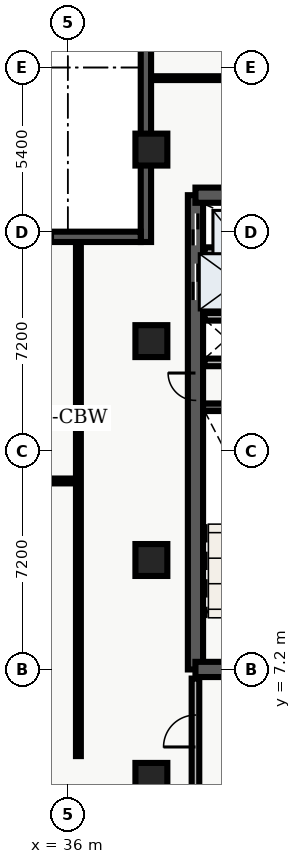
"""IFC4 building model, lengths in metres.
Left out: names, types, materials, properties, quantities, classifications, styles, units other than length and angle.
Written with IfcOpenShell. Run it as: python <this file> out.ifc"""

import sys

from ifc_helpers import new_model, entity, si_unit, converted_unit, direction, frame, origin_with_axes, origin_2d_with_axis, place, context, subcontext, project, spatial, polyline, rectangle, outline, extrude, element, fill, save


model = new_model("IFC4")
c1 = context("Model", 3, precision=1e-05, world=origin_with_axes(), true_north=direction((0.0, 1.0)))
c2 = subcontext(c1, "Body", "Model", "MODEL_VIEW")
j1 = project(units=[si_unit("LENGTHUNIT", "METRE"), converted_unit("PLANEANGLEUNIT", "DEGREE", entity("IfcPlaneAngleMeasure", 0.017), si_unit("PLANEANGLEUNIT", "RADIAN"), dimensions=[0, 0, 0, 0, 0, 0, 0])], contexts=[c1])
p1 = place(None, origin_with_axes())
s1 = spatial("IfcSite", under=j1, at=p1, CompositionType="ELEMENT")
p2 = place(p1, origin_with_axes())
s2 = spatial("IfcBuilding", under=s1, at=p2, CompositionType="ELEMENT")
p3 = place(p2, frame((0.0, 0.0, 171.9), z_axis=(0.0, 0.0, 1.0), x_axis=(1.0, 0.0, 0.0)))
s3 = spatial("IfcBuildingStorey", under=s2, at=p3, CompositionType="ELEMENT", Elevation=171.9)
p4 = place(p3, frame((40.2, 7.2, 0.0), z_axis=(0.0, 0.0, 1.0), x_axis=(0.0, 1.0, 0.0)))
e1 = element("IfcWall", 1, at=p4, inside=s3, PredefinedType="SHEAR", context=c2, shape_type="SweptSolid", body=[
    extrude(outline(polyline([(0.0, -0.25), (15.6, -0.25), (15.6, 0.25), (0.0, 0.25), (0.0, -0.25)])), origin_with_axes(), (0.0, 0.0, 1.0), 3.66),
])
p5 = place(p4, frame((14.475, 0.0, 0.0), z_axis=(0.0, 0.0, 1.0), x_axis=(1.0, 0.0, 0.0)))
e2 = element("IfcOpeningElement", 2, at=p5, cuts=e1, PredefinedType="OPENING", context=c2, shape_type="SweptSolid", body=[
    extrude(rectangle(XDim=1.05, YDim=0.52, at=origin_2d_with_axis()), origin_with_axes(), (0.0, 0.0, 1.0), 2.15),
])
p6 = place(p4, frame((12.75, 0.0, 0.0), z_axis=(0.0, 0.0, 1.0), x_axis=(1.0, 0.0, 0.0)))
e3 = element("IfcOpeningElement", 3, at=p6, cuts=e1, PredefinedType="OPENING", context=c2, shape_type="SweptSolid", body=[
    extrude(rectangle(XDim=1.2, YDim=0.52, at=origin_2d_with_axis()), origin_with_axes(), (0.0, 0.0, 1.0), 2.15),
])
p7 = place(p4, frame((9.3, 0.0, 0.0), z_axis=(0.0, 0.0, 1.0), x_axis=(1.0, 0.0, 0.0)))
e4 = element("IfcOpeningElement", 4, at=p7, cuts=e1, PredefinedType="OPENING", context=c2, shape_type="SweptSolid", body=[
    extrude(rectangle(XDim=0.9, YDim=0.52, at=origin_2d_with_axis()), origin_with_axes(), (0.0, 0.0, 1.0), 2.15),
])
p8 = place(p3, frame((40.2, 7.2, 0.0), z_axis=(0.0, 0.0, 1.0), x_axis=(1.0, 0.0, 0.0)))
e5 = element("IfcWall", 5, at=p8, inside=s3, PredefinedType="SHEAR", context=c2, shape_type="SweptSolid", body=[
    extrude(outline(polyline([(0.0, -0.25), (7.85, -0.25), (7.85, 0.25), (0.0, 0.25), (0.0, -0.25)])), origin_with_axes(), (0.0, 0.0, 1.0), 3.66),
])
p9 = place(p8, frame((2.175, 0.0, 0.0), z_axis=(0.0, 0.0, 1.0), x_axis=(1.0, 0.0, 0.0)))
e6 = element("IfcOpeningElement", 6, at=p9, cuts=e5, PredefinedType="OPENING", context=c2, shape_type="SweptSolid", body=[
    extrude(rectangle(XDim=1.05, YDim=0.52, at=origin_2d_with_axis()), origin_with_axes(), (0.0, 0.0, 1.0), 2.15),
])
p10 = place(p3, frame((40.2, 22.8, 0.0), z_axis=(0.0, 0.0, 1.0), x_axis=(1.0, 0.0, 0.0)))
e7 = element("IfcWall", 7, at=p10, inside=s3, PredefinedType="SHEAR", context=c2, shape_type="SweptSolid", body=[
    extrude(outline(polyline([(0.0, -0.25), (7.85, -0.25), (7.85, 0.25), (0.0, 0.25), (0.0, -0.25)])), origin_with_axes(), (0.0, 0.0, 1.0), 3.66),
])
p11 = place(p10, frame((5.775, 0.0, 0.0), z_axis=(0.0, 0.0, 1.0), x_axis=(1.0, 0.0, 0.0)))
e8 = element("IfcOpeningElement", 8, at=p11, cuts=e7, PredefinedType="OPENING", context=c2, shape_type="SweptSolid", body=[
    extrude(rectangle(XDim=1.05, YDim=0.52, at=origin_2d_with_axis()), origin_with_axes(), (0.0, 0.0, 1.0), 2.15),
])
p12 = place(p3, frame((40.45, 15.825, 0.0), z_axis=(0.0, 0.0, 1.0), x_axis=(1.0, 0.0, 0.0)))
e9 = element("IfcWall", 9, at=p12, inside=s3, PredefinedType="SHEAR", context=c2, shape_type="SweptSolid", body=[
    extrude(outline(polyline([(0.0, -0.125), (3.55, -0.125), (3.55, 0.125), (0.0, 0.125), (0.0, -0.125)])), origin_with_axes(), (0.0, 0.0, 1.0), 3.66),
])
p13 = place(p3, frame((40.5, 17.3, 0.0), z_axis=(0.0, 0.0, 1.0), x_axis=(1.0, 0.0, 0.0)))
e10 = element("IfcWall", 10, at=p13, inside=s3, PredefinedType="SOLIDWALL", context=c2, shape_type="SweptSolid", body=[
    extrude(outline(polyline([(0.0, -0.125), (3.5, -0.125), (3.5, 0.125), (0.0, 0.125), (0.0, -0.125)])), origin_with_axes(), (0.0, 0.0, 1.0), 2.7),
])
p14 = place(p13, frame((2.4, 0.0, 0.0), z_axis=(0.0, 0.0, 1.0), x_axis=(1.0, 0.0, 0.0)))
e11 = element("IfcOpeningElement", 11, at=p14, cuts=e10, PredefinedType="OPENING", context=c2, shape_type="SweptSolid", body=[
    extrude(rectangle(XDim=0.9, YDim=0.27, at=origin_2d_with_axis()), origin_with_axes(), (0.0, 0.0, 1.0), 2.15),
])
p15 = place(p3, frame((40.5, 18.8, 0.0), z_axis=(0.0, 0.0, 1.0), x_axis=(1.0, 0.0, 0.0)))
e12 = element("IfcWall", 12, at=p15, inside=s3, PredefinedType="SOLIDWALL", context=c2, shape_type="SweptSolid", body=[
    extrude(outline(polyline([(0.0, -0.125), (3.5, -0.125), (3.5, 0.125), (0.0, 0.125), (0.0, -0.125)])), origin_with_axes(), (0.0, 0.0, 1.0), 2.7),
])
p16 = place(p3, frame((40.2, 3.1, 0.0), z_axis=(0.0, 0.0, 1.0), x_axis=(0.0, 1.0, 0.0)))
e13 = element("IfcWall", 13, at=p16, inside=s3, PredefinedType="SOLIDWALL", context=c2, shape_type="SweptSolid", body=[
    extrude(outline(polyline([(0.0, -0.125), (3.8, -0.125), (3.8, 0.125), (0.0, 0.125), (0.0, -0.125)])), origin_with_axes(), (0.0, 0.0, 1.0), 2.7),
])
p17 = place(p16, frame((2.075, 0.0, 0.0), z_axis=(0.0, 0.0, 1.0), x_axis=(1.0, 0.0, 0.0)))
e14 = element("IfcOpeningElement", 14, at=p17, cuts=e13, PredefinedType="OPENING", context=c2, shape_type="SweptSolid", body=[
    extrude(rectangle(XDim=1.05, YDim=0.27, at=origin_2d_with_axis()), origin_with_axes(), (0.0, 0.0, 1.0), 2.15),
])
for number, where, z_axis, x_axis in (
    (15, (38.75, 3.6, 0.0), (0.0, 0.0, 1.0), (1.0, 0.0, 0.0)),
    (16, (38.75, 10.8, 0.0), (0.0, 0.0, 1.0), (1.0, 0.0, 0.0)),
    (17, (38.75, 18.0, 0.0), (0.0, 0.0, 1.0), (1.0, 0.0, 0.0)),
    (18, (38.75, 24.3, 0.0), (0.0, 0.0, 1.0), (1.0, 0.0, 0.0)),
):
    element("IfcColumn", number, at=place(p3, frame(where, z_axis=z_axis, x_axis=x_axis)), inside=s3, PredefinedType="COLUMN", context=c2, shape_type="SweptSolid", body=[
        extrude(rectangle(XDim=1.05, YDim=1.05, at=origin_2d_with_axis()), origin_with_axes(), (0.0, 0.0, 1.0), 3.9),
    ])
p18 = place(p3, frame((40.5, 20.96, 0.0), z_axis=(0.0, 0.0, 1.0), x_axis=(1.0, 0.0, 0.0)))
e19 = element("IfcWall", 19, at=p18, inside=s3, PredefinedType="SOLIDWALL", context=c2, shape_type="SweptSolid", body=[
    extrude(outline(polyline([(0.0, -0.125), (3.5, -0.125), (3.5, 0.125), (0.0, 0.125), (0.0, -0.125)])), origin_with_axes(), (0.0, 0.0, 1.0), 2.7),
])
p19 = place(p3, frame((21.15, 13.4, 0.0), z_axis=(0.0, 0.0, 1.0), x_axis=(1.0, 0.0, 0.0)))
e20 = element("IfcWall", 20, at=p19, inside=s3, PredefinedType="PARTITIONING", context=c2, shape_type="SweptSolid", body=[
    extrude(outline(polyline([(0.0, -0.08), (15.2, -0.08), (15.2, 0.08), (0.0, 0.08), (0.0, -0.08)])), origin_with_axes(), (0.0, 0.0, 1.0), 2.7),
])
p20 = place(p19, frame((7.65, 0.0, 0.0), z_axis=(0.0, 0.0, 1.0), x_axis=(1.0, 0.0, 0.0)))
e21 = element("IfcOpeningElement", 21, at=p20, cuts=e20, PredefinedType="OPENING", context=c2, shape_type="SweptSolid", body=[
    extrude(rectangle(XDim=1.2, YDim=0.18, at=origin_2d_with_axis()), origin_with_axes(), (0.0, 0.0, 1.0), 2.2),
])
p21 = place(p3, frame((21.15, 15.7, 0.0), z_axis=(0.0, 0.0, 1.0), x_axis=(1.0, 0.0, 0.0)))
e22 = element("IfcWall", 22, at=p21, inside=s3, PredefinedType="PARTITIONING", context=c2, shape_type="SweptSolid", body=[
    extrude(outline(polyline([(0.0, -0.08), (15.2, -0.08), (15.2, 0.08), (0.0, 0.08), (0.0, -0.08)])), origin_with_axes(), (0.0, 0.0, 1.0), 2.7),
])
p22 = place(p21, frame((2.275, 0.0, 0.0), z_axis=(0.0, 0.0, 1.0), x_axis=(1.0, 0.0, 0.0)))
e23 = element("IfcOpeningElement", 23, at=p22, cuts=e22, PredefinedType="OPENING", context=c2, shape_type="SweptSolid", body=[
    extrude(rectangle(XDim=1.0, YDim=0.18, at=origin_2d_with_axis()), origin_with_axes(), (0.0, 0.0, 1.0), 2.15),
])
p23 = place(p21, frame((6.768, 0.0, 0.0), z_axis=(0.0, 0.0, 1.0), x_axis=(1.0, 0.0, 0.0)))
e24 = element("IfcOpeningElement", 24, at=p23, cuts=e22, PredefinedType="OPENING", context=c2, shape_type="SweptSolid", body=[
    extrude(rectangle(XDim=1.0, YDim=0.18, at=origin_2d_with_axis()), origin_with_axes(), (0.0, 0.0, 1.0), 2.15),
])
p24 = place(p21, frame((12.143, 0.0, 0.0), z_axis=(0.0, 0.0, 1.0), x_axis=(1.0, 0.0, 0.0)))
e25 = element("IfcOpeningElement", 25, at=p24, cuts=e22, PredefinedType="OPENING", context=c2, shape_type="SweptSolid", body=[
    extrude(rectangle(XDim=1.0, YDim=0.18, at=origin_2d_with_axis()), origin_with_axes(), (0.0, 0.0, 1.0), 2.15),
])
p25 = place(p3, frame((36.35, 4.35, 0.0), z_axis=(0.0, 0.0, 1.0), x_axis=(0.0, 1.0, 0.0)))
e26 = element("IfcWall", 26, at=p25, inside=s3, PredefinedType="PARTITIONING", context=c2, shape_type="SweptSolid", body=[
    extrude(outline(polyline([(0.0, -0.08), (16.95, -0.08), (16.95, 0.08), (0.0, 0.08), (0.0, -0.08)])), origin_with_axes(), (0.0, 0.0, 1.0), 2.7),
])
p26 = place(p3, frame((38.735, 26.65, 0.0), z_axis=(0.0, 0.0, 1.0), x_axis=(1.0, 0.0, 0.0)))
e27 = element("IfcWall", 27, at=p26, inside=s3, PredefinedType="PARTITIONING", context=c2, shape_type="SweptSolid", body=[
    extrude(outline(polyline([(0.0, -0.062), (20.905, -0.062), (20.905, 0.062), (0.0, 0.062), (0.0, -0.062)])), origin_with_axes(), (0.0, 0.0, 1.0), 2.7),
])
p27 = place(p26, frame((4.265, 0.0, 0.0), z_axis=(0.0, 0.0, 1.0), x_axis=(1.0, 0.0, 0.0)))
e28 = element("IfcOpeningElement", 28, at=p27, cuts=e27, PredefinedType="OPENING", context=c2, shape_type="SweptSolid", body=[
    extrude(rectangle(XDim=1.0, YDim=0.145, at=origin_2d_with_axis()), origin_with_axes(), (0.0, 0.0, 1.0), 2.15),
])
p28 = place(p3, frame((38.57, 21.26, 0.0), z_axis=(0.0, 0.0, 1.0), x_axis=(0.0, 1.0, 0.0)))
e29 = element("IfcWall", 29, at=p28, inside=s3, PredefinedType="SOLIDWALL", context=c2, shape_type="SweptSolid", body=[
    extrude(outline(polyline([(0.0, -0.17), (7.54, -0.17), (7.54, 0.17), (0.0, 0.17), (0.0, -0.17)])), origin_with_axes(), (0.0, 0.0, 1.0), 3.66),
])
p29 = place(p3, frame((24.398, 21.43, 0.0), z_axis=(0.0, 0.0, 1.0), x_axis=(1.0, 0.0, 0.0)))
e30 = element("IfcWall", 30, at=p29, inside=s3, PredefinedType="SOLIDWALL", context=c2, shape_type="SweptSolid", body=[
    extrude(outline(polyline([(0.0, -0.17), (14.002, -0.17), (14.002, 0.17), (0.0, 0.17), (0.0, -0.17)])), origin_with_axes(), (0.0, 0.0, 1.0), 3.66),
])
p30 = place(p29, frame((3.801, 0.0, 0.45), z_axis=(0.0, 0.0, 1.0), x_axis=(1.0, 0.0, 0.0)))
e31 = element("IfcOpeningElement", 31, at=p30, cuts=e30, PredefinedType="OPENING", context=c2, shape_type="SweptSolid", body=[
    extrude(rectangle(XDim=1.8, YDim=0.36, at=origin_2d_with_axis()), origin_with_axes(), (0.0, 0.0, 1.0), 2.1),
])
p31 = place(p29, frame((10.201, 0.0, 0.45), z_axis=(0.0, 0.0, 1.0), x_axis=(1.0, 0.0, 0.0)))
e32 = element("IfcOpeningElement", 32, at=p31, cuts=e30, PredefinedType="OPENING", context=c2, shape_type="SweptSolid", body=[
    extrude(rectangle(XDim=1.8, YDim=0.36, at=origin_2d_with_axis()), origin_with_axes(), (0.0, 0.0, 1.0), 2.1),
])
p32 = place(p4, frame((14.475, 0.0, 0.0), z_axis=(0.0, 0.0, 1.0), x_axis=(1.0, 0.0, 0.0)))
e33 = element("IfcDoor", 33, at=p32, inside=s3, OperationType="SLIDING_TO_RIGHT", PredefinedType="DOOR", context=c2, shape_type="SweptSolid", body=[
    extrude(rectangle(XDim=1.05, YDim=0.09, at=origin_2d_with_axis()), origin_with_axes(), (0.0, 0.0, 1.0), 2.15),
])
fill(e2, e33)
p33 = place(p4, frame((12.75, 0.0, 0.0), z_axis=(0.0, 0.0, 1.0), x_axis=(1.0, 0.0, 0.0)))
e34 = element("IfcDoor", 34, at=p33, inside=s3, OperationType="DOUBLE_DOOR_SLIDING", PredefinedType="DOOR", context=c2, shape_type="SweptSolid", body=[
    extrude(rectangle(XDim=1.2, YDim=0.09, at=origin_2d_with_axis()), origin_with_axes(), (0.0, 0.0, 1.0), 2.15),
])
fill(e3, e34)
p34 = place(p4, frame((9.3, 0.0, 0.0), z_axis=(0.0, 0.0, 1.0), x_axis=(1.0, 0.0, 0.0)))
e35 = element("IfcDoor", 35, at=p34, inside=s3, OperationType="SINGLE_SWING_RIGHT", PredefinedType="DOOR", context=c2, shape_type="SweptSolid", body=[
    extrude(rectangle(XDim=0.9, YDim=0.09, at=origin_2d_with_axis()), origin_with_axes(), (0.0, 0.0, 1.0), 2.15),
])
fill(e4, e35)
p35 = place(p16, frame((2.075, 0.0, 0.0), z_axis=(0.0, 0.0, 1.0), x_axis=(1.0, 0.0, 0.0)))
e36 = element("IfcDoor", 36, at=p35, inside=s3, OperationType="SINGLE_SWING_LEFT", PredefinedType="DOOR", context=c2, shape_type="SweptSolid", body=[
    extrude(rectangle(XDim=1.05, YDim=0.09, at=origin_2d_with_axis()), origin_with_axes(), (0.0, 0.0, 1.0), 2.15),
])
fill(e14, e36)
p36 = place(p29, frame((10.201, 0.0, 0.45), z_axis=(0.0, 0.0, 1.0), x_axis=(1.0, 0.0, 0.0)))
e37 = element("IfcWindow", 37, at=p36, inside=s3, PredefinedType="WINDOW", context=c2, shape_type="SweptSolid", body=[
    extrude(rectangle(XDim=1.8, YDim=0.09, at=origin_2d_with_axis()), origin_with_axes(), (0.0, 0.0, 1.0), 2.1),
])
fill(e32, e37)
save(model, sys.argv[1])
